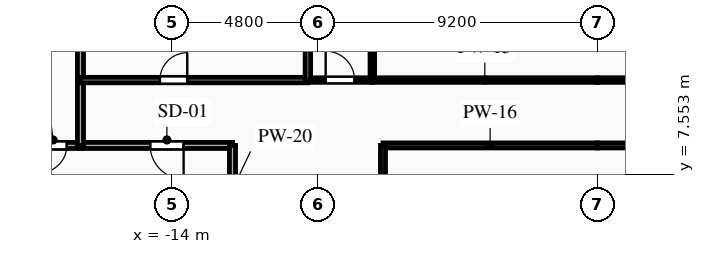
"""IFC4 building model, lengths in metres.
Left out: names, types, materials, properties, quantities, classifications, styles, units other than length and angle.
Written with IfcOpenShell. Run it as: python <this file> out.ifc"""

import sys

from ifc_helpers import new_model, si_unit, direction, frame, frame_2d, origin, place, context, subcontext, project, spatial, rectangle, extrude, element, fill, save


model = new_model("IFC4")
c1 = context("Model", 3, precision=1e-05, world=origin(), true_north=direction((0.0, 1.0)))
c2 = subcontext(c1, "Body", "Model", "MODEL_VIEW")
j1 = project(units=[si_unit("LENGTHUNIT", "METRE"), si_unit("PLANEANGLEUNIT", "RADIAN")], contexts=[c1])
p1 = place(None, origin())
s1 = spatial("IfcSite", under=j1, at=p1, CompositionType="ELEMENT")
p2 = place(p1, origin())
s2 = spatial("IfcBuilding", under=s1, at=p2, CompositionType="ELEMENT")
p3 = place(p2, origin())
s3 = spatial("IfcBuildingStorey", under=s2, at=p3, CompositionType="ELEMENT", Elevation=0.0)
p4 = place(p3, frame((-17.0, 8.5, 0.0), z_axis=(0.0, 0.0, 1.0), x_axis=(-1.0, 0.0, 0.0)))
e1 = element("IfcWall", 1, at=p4, inside=s3, PredefinedType="PARTITIONING", context=c2, shape_type="SweptSolid", body=[
    extrude(rectangle(XDim=1.8, YDim=0.2, at=frame_2d((0.9, 0.0))), origin(), (0.0, 0.0, 1.0), 4.17),
])
p5 = place(p4, frame((0.45, 0.0, 0.0)))
e2 = element("IfcOpeningElement", 2, at=p5, cuts=e1, PredefinedType="OPENING", context=c2, shape_type="SweptSolid", body=[
    extrude(rectangle(XDim=0.9, YDim=2.1, at=frame_2d((0.45, 1.05))), frame((0.0, 0.11, 0.0), z_axis=(0.0, -1.0, 0.0), x_axis=(1.0, 0.0, 0.0)), (0.0, 0.0, 1.0), 0.22),
])
p6 = place(p3, frame((-12.0, 8.5, 0.0), z_axis=(0.0, 0.0, 1.0), x_axis=(-1.0, 0.0, 0.0)))
e3 = element("IfcWall", 3, at=p6, inside=s3, PredefinedType="PARTITIONING", context=c2, shape_type="SweptSolid", body=[
    extrude(rectangle(XDim=5.0, YDim=0.2, at=frame_2d((2.5, 0.0))), origin(), (0.0, 0.0, 1.0), 4.17),
])
p7 = place(p6, frame((1.607, 0.0, 0.0)))
e4 = element("IfcOpeningElement", 4, at=p7, cuts=e3, PredefinedType="OPENING", context=c2, shape_type="SweptSolid", body=[
    extrude(rectangle(XDim=1.1, YDim=2.15, at=frame_2d((0.55, 1.075))), frame((0.0, 0.11, 0.0), z_axis=(0.0, -1.0, 0.0), x_axis=(1.0, 0.0, 0.0)), (0.0, 0.0, 1.0), 0.22),
])
p8 = place(p3, frame((-12.0, 5.6, 0.0), z_axis=(0.0, 0.0, 1.0), x_axis=(0.0, 1.0, 0.0)))
e5 = element("IfcWall", 5, at=p8, inside=s3, PredefinedType="PARTITIONING", context=c2, shape_type="SweptSolid", body=[
    extrude(rectangle(XDim=2.9, YDim=0.2, at=frame_2d((1.45, 0.0))), origin(), (0.0, 0.0, 1.0), 4.17),
])
p9 = place(p3, frame((-17.0, 10.65, 0.0), z_axis=(0.0, 0.0, 1.0), x_axis=(0.0, -1.0, 0.0)))
e6 = element("IfcWall", 6, at=p9, inside=s3, PredefinedType="PARTITIONING", context=c2, shape_type="SweptSolid", body=[
    extrude(rectangle(XDim=2.15, YDim=0.2, at=frame_2d((1.075, 0.0))), origin(), (0.0, 0.0, 1.0), 4.17),
])
p10 = place(p3, frame((-17.0, 18.75, 0.0), z_axis=(0.0, 0.0, 1.0), x_axis=(0.0, -1.0, 0.0)))
e7 = element("IfcWall", 7, at=p10, inside=s3, PredefinedType="PARTITIONING", context=c2, shape_type="SweptSolid", body=[
    extrude(rectangle(XDim=8.1, YDim=0.2, at=frame_2d((4.05, 0.0))), origin(), (0.0, 0.0, 1.0), 4.17),
])
p11 = place(p3, frame((-17.0, 10.65, 0.0), z_axis=(0.0, 0.0, 1.0), x_axis=(1.0, 0.0, 0.0)))
e8 = element("IfcWall", 8, at=p11, inside=s3, PredefinedType="PARTITIONING", context=c2, shape_type="SweptSolid", body=[
    extrude(rectangle(XDim=7.48, YDim=0.18, at=frame_2d((3.74, 0.0))), origin(), (0.0, 0.0, 1.0), 4.17),
])
p12 = place(p11, frame((2.613, 0.0, 0.0)))
e9 = element("IfcOpeningElement", 9, at=p12, cuts=e8, PredefinedType="OPENING", context=c2, shape_type="SweptSolid", body=[
    extrude(rectangle(XDim=0.9, YDim=2.1, at=frame_2d((0.45, 1.05))), frame((0.0, 0.1, 0.0), z_axis=(0.0, -1.0, 0.0), x_axis=(1.0, 0.0, 0.0)), (0.0, 0.0, 1.0), 0.2),
])
p13 = place(p3, frame((-9.52, 10.65, 0.0), z_axis=(0.0, 0.0, 1.0), x_axis=(1.0, 0.0, 0.0)))
e10 = element("IfcWall", 10, at=p13, inside=s3, PredefinedType="PARTITIONING", context=c2, shape_type="SweptSolid", body=[
    extrude(rectangle(XDim=2.12, YDim=0.15, at=frame_2d((1.06, 0.0))), origin(), (0.0, 0.0, 1.0), 4.17),
])
p14 = place(p13, frame((0.585, 0.0, 0.0)))
e11 = element("IfcOpeningElement", 11, at=p14, cuts=e10, PredefinedType="OPENING", context=c2, shape_type="SweptSolid", body=[
    extrude(rectangle(XDim=0.95, YDim=2.1, at=frame_2d((0.475, 1.05))), frame((0.0, 0.085, 0.0), z_axis=(0.0, -1.0, 0.0), x_axis=(1.0, 0.0, 0.0)), (0.0, 0.0, 1.0), 0.17),
])
p15 = place(p3, frame((-7.4, 10.65, 0.0), z_axis=(0.0, 0.0, 1.0), x_axis=(1.0, 0.0, 0.0)))
e12 = element("IfcWall", 12, at=p15, inside=s3, PredefinedType="PARTITIONING", context=c2, shape_type="SweptSolid", body=[
    extrude(rectangle(XDim=7.4, YDim=0.15, at=frame_2d((3.7, 0.0))), origin(), (0.0, 0.0, 1.0), 4.17),
])
p16 = place(p3, frame((0.0, 8.5, 0.0), z_axis=(0.0, 0.0, 1.0), x_axis=(-1.0, 0.0, 0.0)))
e13 = element("IfcWall", 13, at=p16, inside=s3, PredefinedType="PARTITIONING", context=c2, shape_type="SweptSolid", body=[
    extrude(rectangle(XDim=7.05, YDim=0.165, at=frame_2d((3.525, 0.0))), origin(), (0.0, 0.0, 1.0), 4.17),
])
p17 = place(p3, frame((0.0, 10.65, 0.0), z_axis=(0.0, 0.0, 1.0), x_axis=(1.0, 0.0, 0.0)))
e14 = element("IfcWall", 14, at=p17, inside=s3, PredefinedType="PARTITIONING", context=c2, shape_type="SweptSolid", body=[
    extrude(rectangle(XDim=17.0, YDim=0.15, at=frame_2d((8.5, 0.0))), origin(), (0.0, 0.0, 1.0), 4.17),
])
p18 = place(p17, frame((2.385, 0.0, 0.0)))
e15 = element("IfcOpeningElement", 15, at=p18, cuts=e14, PredefinedType="OPENING", context=c2, shape_type="SweptSolid", body=[
    extrude(rectangle(XDim=1.4, YDim=2.3, at=frame_2d((0.7, 1.15))), frame((0.0, 0.085, 0.0), z_axis=(0.0, -1.0, 0.0), x_axis=(1.0, 0.0, 0.0)), (0.0, 0.0, 1.0), 0.17),
])
p19 = place(p3, frame((7.05, 8.5, 0.0), z_axis=(0.0, 0.0, 1.0), x_axis=(-1.0, 0.0, 0.0)))
e16 = element("IfcWall", 16, at=p19, inside=s3, PredefinedType="PARTITIONING", context=c2, shape_type="SweptSolid", body=[
    extrude(rectangle(XDim=7.05, YDim=0.165, at=frame_2d((3.525, 0.0))), origin(), (0.0, 0.0, 1.0), 4.17),
])
p20 = place(p3, frame((-7.05, 8.5, 0.0), z_axis=(0.0, 0.0, 1.0), x_axis=(0.0, -1.0, 0.0)))
e17 = element("IfcWall", 17, at=p20, inside=s3, PredefinedType="PARTITIONING", context=c2, shape_type="SweptSolid", body=[
    extrude(rectangle(XDim=14.1, YDim=0.165, at=frame_2d((7.05, 0.0))), origin(), (0.0, 0.0, 1.0), 4.17),
])
p21 = place(p20, frame((7.949, 0.0, 0.0)))
e18 = element("IfcOpeningElement", 18, at=p21, cuts=e17, PredefinedType="OPENING", context=c2, shape_type="SweptSolid", body=[
    extrude(rectangle(XDim=1.15, YDim=2.15, at=frame_2d((0.575, 1.075))), frame((0.0, 0.093, 0.0), z_axis=(0.0, -1.0, 0.0), x_axis=(1.0, 0.0, 0.0)), (0.0, 0.0, 1.0), 0.185),
])
p22 = place(p3, frame((-9.52, 18.75, 0.0), z_axis=(0.0, 0.0, 1.0), x_axis=(0.0, -1.0, 0.0)))
e19 = element("IfcWall", 19, at=p22, inside=s3, PredefinedType="PARTITIONING", context=c2, shape_type="SweptSolid", body=[
    extrude(rectangle(XDim=8.1, YDim=0.18, at=frame_2d((4.05, 0.0))), origin(), (0.0, 0.0, 1.0), 3.655),
])
p23 = place(p3, frame((-7.4, 18.75, 0.0), z_axis=(0.0, 0.0, 1.0), x_axis=(0.0, -1.0, 0.0)))
e20 = element("IfcWall", 20, at=p23, inside=s3, PredefinedType="PARTITIONING", context=c2, shape_type="SweptSolid", body=[
    extrude(rectangle(XDim=8.1, YDim=0.15, at=frame_2d((4.05, 0.0))), origin(), (0.0, 0.0, 1.0), 4.17),
])
p24 = place(p5, origin())
e21 = element("IfcDoor", 21, at=p24, inside=s3, OperationType="SINGLE_SWING_RIGHT", PredefinedType="DOOR", context=c2, shape_type="SweptSolid", body=[
    extrude(rectangle(XDim=0.9, YDim=2.1, at=frame_2d((0.45, 1.05))), frame((0.0, 0.025, 0.0), z_axis=(0.0, -1.0, 0.0), x_axis=(1.0, 0.0, 0.0)), (0.0, 0.0, 1.0), 0.05),
])
fill(e2, e21)
p25 = place(p7, origin())
e22 = element("IfcDoor", 22, at=p25, inside=s3, OperationType="SINGLE_SWING_LEFT", PredefinedType="DOOR", context=c2, shape_type="SweptSolid", body=[
    extrude(rectangle(XDim=1.1, YDim=2.15, at=frame_2d((0.55, 1.075))), frame((0.0, 0.025, 0.0), z_axis=(0.0, -1.0, 0.0), x_axis=(1.0, 0.0, 0.0)), (0.0, 0.0, 1.0), 0.05),
])
fill(e4, e22)
p26 = place(p12, origin())
e23 = element("IfcDoor", 23, at=p26, inside=s3, OperationType="SINGLE_SWING_RIGHT", PredefinedType="DOOR", context=c2, shape_type="SweptSolid", body=[
    extrude(rectangle(XDim=0.9, YDim=2.1, at=frame_2d((0.45, 1.05))), frame((0.0, 0.025, 0.0), z_axis=(0.0, -1.0, 0.0), x_axis=(1.0, 0.0, 0.0)), (0.0, 0.0, 1.0), 0.05),
])
fill(e9, e23)
p27 = place(p14, origin())
e24 = element("IfcDoor", 24, at=p27, inside=s3, OperationType="SINGLE_SWING_LEFT", PredefinedType="DOOR", context=c2, shape_type="SweptSolid", body=[
    extrude(rectangle(XDim=0.95, YDim=2.1, at=frame_2d((0.475, 1.05))), frame((0.0, 0.025, 0.0), z_axis=(0.0, -1.0, 0.0), x_axis=(1.0, 0.0, 0.0)), (0.0, 0.0, 1.0), 0.05),
])
fill(e11, e24)
save(model, sys.argv[1])
